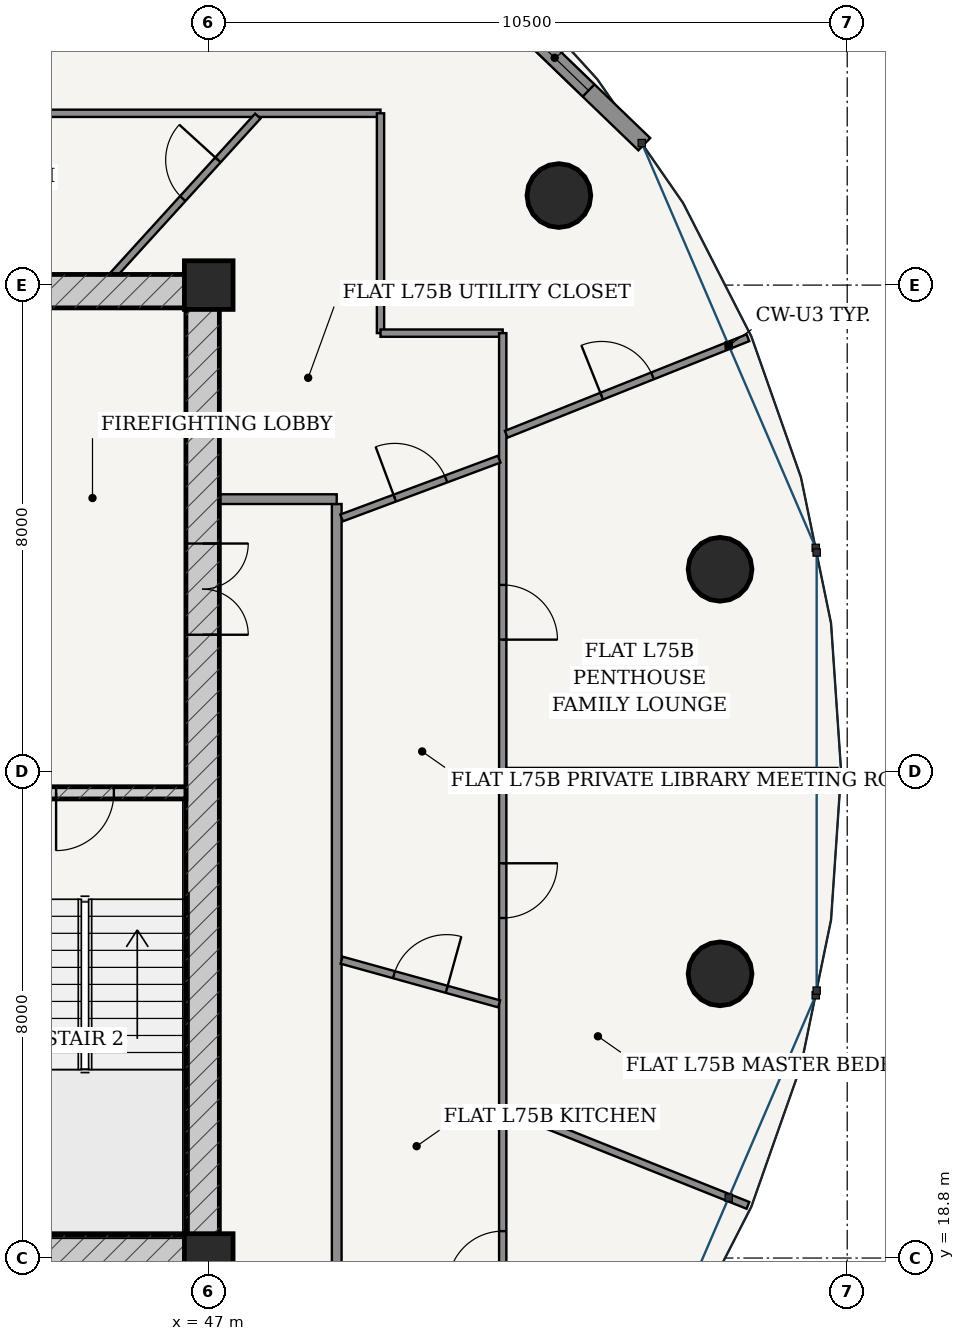
"""IFC4 building model, lengths in metres.
Left out: names, types, materials, properties, quantities, classifications, styles, units other than length and angle.
Written with IfcOpenShell. Run it as: python <this file> out.ifc"""

import sys

from ifc_helpers import new_model, si_unit, direction, frame, frame_2d, origin, origin_2d, place, context, subcontext, project, spatial, rectangle, hollow_circle, extrude, source, transform, mapped, element, fill, save


model = new_model("IFC4")
c1 = context("Model", 3, precision=1e-05, world=origin(), true_north=direction((-0.2419218956, 0.970295726276)))
c2 = subcontext(c1, "Body", "Model", "MODEL_VIEW")
j1 = project(units=[si_unit("LENGTHUNIT", "METRE"), si_unit("PLANEANGLEUNIT", "RADIAN")], contexts=[c1])
p1 = place(None, origin())
s1 = spatial("IfcSite", under=j1, at=p1, CompositionType="ELEMENT")
p2 = place(p1, origin())
s2 = spatial("IfcBuilding", under=s1, at=p2, CompositionType="ELEMENT")
p3 = place(p2, frame((0.0, 0.0, 285.7)))
s3 = spatial("IfcBuildingStorey", under=s2, at=p3, CompositionType="ELEMENT", Elevation=285.7)
for number, where, z_axis, x_axis in (
    (1, (47.0, 18.8, 0.0), (0.0, 0.0, 1.0), (1.0, 0.0, 0.0)),
    (2, (47.0, 34.8, 0.0), (0.0, 0.0, 1.0), (1.0, 0.0, 0.0)),
):
    element("IfcColumn", number, at=place(p3, frame(where, z_axis=z_axis, x_axis=x_axis)), inside=s3, PredefinedType="COLUMN", context=c2, shape_type="SweptSolid", body=[
        extrude(rectangle(XDim=0.8, YDim=0.8, at=origin_2d()), origin(), (0.0, 0.0, 1.0), 3.75),
    ])
p4 = place(p3, frame((28.825, 18.9, 0.0), z_axis=(0.0, 0.0, 1.0), x_axis=(1.0, 0.0, 0.0)))
e3 = element("IfcWall", 3, at=p4, inside=s3, PredefinedType="SHEAR", context=c2, shape_type="SweptSolid", body=[
    extrude(rectangle(XDim=18.35, YDim=0.55, at=frame_2d((9.175, 0.0))), origin(), (0.0, 0.0, 1.0), 3.49),
])
p5 = place(p4, frame((7.41, 0.0, 0.0)))
e4 = element("IfcOpeningElement", 4, at=p5, cuts=e3, PredefinedType="OPENING", context=c2, shape_type="SweptSolid", body=[
    extrude(rectangle(XDim=0.85, YDim=2.1, at=frame_2d((0.425, 1.05))), frame((0.0, 0.285, 0.0), z_axis=(0.0, -1.0, 0.0), x_axis=(1.0, 0.0, 0.0)), (0.0, 0.0, 1.0), 0.57),
])
p6 = place(p4, frame((10.49, 0.0, 0.0)))
e5 = element("IfcOpeningElement", 5, at=p6, cuts=e3, PredefinedType="OPENING", context=c2, shape_type="SweptSolid", body=[
    extrude(rectangle(XDim=0.85, YDim=2.1, at=frame_2d((0.425, 1.05))), frame((0.0, 0.285, 0.0), z_axis=(0.0, -1.0, 0.0), x_axis=(1.0, 0.0, 0.0)), (0.0, 0.0, 1.0), 0.57),
])
p7 = place(p3, frame((28.825, 34.7, 0.0), z_axis=(0.0, 0.0, 1.0), x_axis=(1.0, 0.0, 0.0)))
e6 = element("IfcWall", 6, at=p7, inside=s3, PredefinedType="SHEAR", context=c2, shape_type="SweptSolid", body=[
    extrude(rectangle(XDim=18.35, YDim=0.55, at=frame_2d((9.175, 0.0))), origin(), (0.0, 0.0, 1.0), 3.49),
])
p8 = place(p3, frame((46.9, 19.175, 0.0), z_axis=(0.0, 0.0, 1.0), x_axis=(0.0, 1.0, 0.0)))
e7 = element("IfcWall", 7, at=p8, inside=s3, PredefinedType="SHEAR", context=c2, shape_type="SweptSolid", body=[
    extrude(rectangle(XDim=15.25, YDim=0.55, at=frame_2d((7.625, 0.0))), origin(), (0.0, 0.0, 1.0), 3.49),
])
p9 = place(p8, frame((9.875, 0.0, 0.0)))
e8 = element("IfcOpeningElement", 8, at=p9, cuts=e7, PredefinedType="OPENING", context=c2, shape_type="SweptSolid", body=[
    extrude(rectangle(XDim=1.5, YDim=2.2, at=frame_2d((0.75, 1.1))), frame((0.0, 0.285, 0.0), z_axis=(0.0, -1.0, 0.0), x_axis=(1.0, 0.0, 0.0)), (0.0, 0.0, 1.0), 0.57),
])
p10 = place(p3, frame((43.305, 26.45, 0.0), z_axis=(0.0, 0.0, 1.0), x_axis=(1.0, 0.0, 0.0)))
e9 = element("IfcWall", 9, at=p10, inside=s3, PredefinedType="SOLIDWALL", context=c2, shape_type="SweptSolid", body=[
    extrude(rectangle(XDim=3.32, YDim=0.2, at=frame_2d((1.66, 0.0))), origin(), (0.0, 0.0, 1.0), 3.49),
])
p11 = place(p10, frame((1.185, 0.0, 0.0)))
e10 = element("IfcOpeningElement", 10, at=p11, cuts=e9, PredefinedType="OPENING", context=c2, shape_type="SweptSolid", body=[
    extrude(rectangle(XDim=0.95, YDim=2.15, at=frame_2d((0.475, 1.075))), frame((0.0, 0.11, 0.0), z_axis=(0.0, -1.0, 0.0), x_axis=(1.0, 0.0, 0.0)), (0.0, 0.0, 1.0), 0.22),
])
for number, where, z_axis, x_axis in (
    (11, (55.409, 30.126, 0.0), (0.0, 0.0, 1.0), (1.0, 0.0, 0.0)),
    (12, (52.759, 36.272, 0.0), (0.0, 0.0, 1.0), (1.0, 0.0, 0.0)),
    (13, (55.409, 23.474, 0.0), (0.0, 0.0, 1.0), (1.0, 0.0, 0.0)),
):
    element("IfcColumn", number, at=place(p3, frame(where, z_axis=z_axis, x_axis=x_axis)), inside=s3, PredefinedType="COLUMN", context=c2, shape_type="SweptSolid", body=[
        extrude(hollow_circle(Radius=0.525, WallThickness=0.035, at=origin_2d()), origin(), (0.0, 0.0, 1.0), 3.75),
    ])
p12 = place(p3, frame((54.163, 37.117, 0.0), z_axis=(0.0, 0.0, 1.0), x_axis=(-0.719979309073, 0.693995529169, 0.0)))
e14 = element("IfcWall", 14, at=p12, inside=s3, PredefinedType="SOLIDWALL", context=c2, shape_type="SweptSolid", body=[
    extrude(rectangle(XDim=7.583, YDim=0.28, at=frame_2d((3.791, 0.0))), origin(), (0.0, 0.0, 1.0), 3.49),
])
p13 = place(p12, frame((1.272, 0.0, 0.85)))
e15 = element("IfcOpeningElement", 15, at=p13, cuts=e14, PredefinedType="OPENING", context=c2, shape_type="SweptSolid", body=[
    extrude(rectangle(XDim=1.55, YDim=1.95, at=frame_2d((0.775, 0.975))), frame((0.0, 0.15, 0.0), z_axis=(0.0, -1.0, 0.0), x_axis=(1.0, 0.0, 0.0)), (0.0, 0.0, 1.0), 0.3),
])
p14 = place(p12, frame((4.76, 0.0, 0.85)))
e16 = element("IfcOpeningElement", 16, at=p14, cuts=e14, PredefinedType="OPENING", context=c2, shape_type="SweptSolid", body=[
    extrude(rectangle(XDim=1.55, YDim=1.95, at=frame_2d((0.775, 0.975))), frame((0.0, 0.15, 0.0), z_axis=(0.0, -1.0, 0.0), x_axis=(1.0, 0.0, 0.0)), (0.0, 0.0, 1.0), 0.3),
])
p15 = place(p3, frame((49.105, 17.275, 0.0), z_axis=(0.0, 0.0, 1.0), x_axis=(0.0, 1.0, 0.0)))
e17 = element("IfcWall", 17, at=p15, inside=s3, PredefinedType="PARTITIONING", context=c2, shape_type="SweptSolid", body=[
    extrude(rectangle(XDim=13.925, YDim=0.16, at=frame_2d((6.962, 0.0))), origin(), (0.0, 0.0, 1.0), 3.015),
])
p16 = place(p3, frame((47.175, 31.28, 0.0), z_axis=(0.0, 0.0, 1.0), x_axis=(1.0, 0.0, 0.0)))
e18 = element("IfcWall", 18, at=p16, inside=s3, PredefinedType="PARTITIONING", context=c2, shape_type="SweptSolid", body=[
    extrude(rectangle(XDim=1.93, YDim=0.16, at=frame_2d((0.965, 0.0))), origin(), (0.0, 0.0, 1.0), 3.49),
])
p17 = place(p3, frame((40.336, 37.625, 0.0), z_axis=(0.0, 0.0, 1.0), x_axis=(1.0, 0.0, 0.0)))
e19 = element("IfcWall", 19, at=p17, inside=s3, PredefinedType="PARTITIONING", context=c2, shape_type="SweptSolid", body=[
    extrude(rectangle(XDim=9.489, YDim=0.12, at=frame_2d((4.745, 0.0))), origin(), (0.0, 0.0, 1.0), 3.015),
])
p18 = place(p3, frame((49.825, 37.625, 0.0), z_axis=(0.0, 0.0, 1.0), x_axis=(0.0, -1.0, 0.0)))
e20 = element("IfcWall", 20, at=p18, inside=s3, PredefinedType="PARTITIONING", context=c2, shape_type="SweptSolid", body=[
    extrude(rectangle(XDim=3.615, YDim=0.12, at=frame_2d((1.808, 0.0))), origin(), (0.0, 0.0, 1.0), 3.015),
])
p19 = place(p3, frame((49.825, 34.01, 0.0), z_axis=(0.0, 0.0, 1.0), x_axis=(1.0, 0.0, 0.0)))
e21 = element("IfcWall", 21, at=p19, inside=s3, PredefinedType="PARTITIONING", context=c2, shape_type="SweptSolid", body=[
    extrude(rectangle(XDim=2.01, YDim=0.12, at=frame_2d((1.005, 0.0))), origin(), (0.0, 0.0, 1.0), 3.209),
])
p20 = place(p3, frame((51.835, 34.01, 0.0), z_axis=(0.0, 0.0, 1.0), x_axis=(0.0, -1.0, 0.0)))
e22 = element("IfcWall", 22, at=p20, inside=s3, PredefinedType="PARTITIONING", context=c2, shape_type="SweptSolid", body=[
    extrude(rectangle(XDim=19.545, YDim=0.12, at=frame_2d((9.772, 0.0))), origin(), (0.0, 0.0, 1.0), 3.015),
])
p21 = place(p20, frame((14.768, 0.0, 0.0)))
e23 = element("IfcOpeningElement", 23, at=p21, cuts=e22, PredefinedType="OPENING", context=c2, shape_type="SweptSolid", body=[
    extrude(rectangle(XDim=0.9, YDim=2.15, at=frame_2d((0.45, 1.075))), frame((0.0, 0.07, 0.0), z_axis=(0.0, -1.0, 0.0), x_axis=(1.0, 0.0, 0.0)), (0.0, 0.0, 1.0), 0.14),
])
p22 = place(p20, frame((8.718, 0.0, 0.0)))
e24 = element("IfcOpeningElement", 24, at=p22, cuts=e22, PredefinedType="OPENING", context=c2, shape_type="SweptSolid", body=[
    extrude(rectangle(XDim=0.9, YDim=2.15, at=frame_2d((0.45, 1.075))), frame((0.0, 0.07, 0.0), z_axis=(0.0, -1.0, 0.0), x_axis=(1.0, 0.0, 0.0)), (0.0, 0.0, 1.0), 0.14),
])
p23 = place(p20, frame((4.14, 0.0, 0.0)))
e25 = element("IfcOpeningElement", 25, at=p23, cuts=e22, PredefinedType="OPENING", context=c2, shape_type="SweptSolid", body=[
    extrude(rectangle(XDim=0.9, YDim=2.15, at=frame_2d((0.45, 1.075))), frame((0.0, 0.07, 0.0), z_axis=(0.0, -1.0, 0.0), x_axis=(1.0, 0.0, 0.0)), (0.0, 0.0, 1.0), 0.14),
])
p24 = place(p3, frame((51.893, 21.253, 0.0), z_axis=(0.0, 0.0, 1.0), x_axis=(0.928712556691, -0.370800467966, 0.0)))
e26 = element("IfcWall", 26, at=p24, inside=s3, PredefinedType="PARTITIONING", context=c2, shape_type="SweptSolid", body=[
    extrude(rectangle(XDim=4.28, YDim=0.12, at=frame_2d((2.14, 0.0))), origin(), (0.0, 0.0, 1.0), 3.121),
])
p25 = place(p3, frame((51.897, 26.8, 0.0), z_axis=(0.0, 0.0, 1.0), x_axis=(1.0, 0.0, 0.0)))
e27 = element("IfcWall", 27, at=p25, inside=s3, PredefinedType="PARTITIONING", context=c2, shape_type="SweptSolid", body=[
    extrude(rectangle(XDim=5.443, YDim=0.12, at=frame_2d((2.722, 0.0))), origin(), (0.0, 0.0, 1.0), 3.121),
])
p26 = place(p3, frame((51.893, 32.347, 0.0), z_axis=(0.0, 0.0, 1.0), x_axis=(0.928712556691, 0.370800467966, 0.0)))
e28 = element("IfcWall", 28, at=p26, inside=s3, PredefinedType="PARTITIONING", context=c2, shape_type="SweptSolid", body=[
    extrude(rectangle(XDim=4.28, YDim=0.12, at=frame_2d((2.14, 0.0))), origin(), (0.0, 0.0, 1.0), 3.121),
])
p27 = place(p26, frame((1.69, 0.0, 0.0)))
e29 = element("IfcOpeningElement", 29, at=p27, cuts=e28, PredefinedType="OPENING", context=c2, shape_type="SweptSolid", body=[
    extrude(rectangle(XDim=0.9, YDim=2.15, at=frame_2d((0.45, 1.075))), frame((0.0, 0.07, 0.0), z_axis=(0.0, -1.0, 0.0), x_axis=(1.0, 0.0, 0.0)), (0.0, 0.0, 1.0), 0.14),
])
p28 = place(p3, frame((49.185, 23.698, 0.0), z_axis=(0.0, 0.0, 1.0), x_axis=(0.963633636359, -0.267226897744, 0.0)))
e30 = element("IfcWall", 30, at=p28, inside=s3, PredefinedType="PARTITIONING", context=c2, shape_type="SweptSolid", body=[
    extrude(rectangle(XDim=2.688, YDim=0.12, at=frame_2d((1.344, 0.0))), origin(), (0.0, 0.0, 1.0), 3.209),
])
p29 = place(p28, frame((0.894, 0.0, 0.0)))
e31 = element("IfcOpeningElement", 31, at=p29, cuts=e30, PredefinedType="OPENING", context=c2, shape_type="SweptSolid", body=[
    extrude(rectangle(XDim=0.9, YDim=2.15, at=frame_2d((0.45, 1.075))), frame((0.0, 0.07, 0.0), z_axis=(0.0, -1.0, 0.0), x_axis=(1.0, 0.0, 0.0)), (0.0, 0.0, 1.0), 0.14),
])
p30 = place(p3, frame((49.185, 30.971, 0.0), z_axis=(0.0, 0.0, 1.0), x_axis=(0.93696600231, 0.349420535338, 0.0)))
e32 = element("IfcWall", 32, at=p30, inside=s3, PredefinedType="PARTITIONING", context=c2, shape_type="SweptSolid", body=[
    extrude(rectangle(XDim=2.766, YDim=0.12, at=frame_2d((1.383, 0.0))), origin(), (0.0, 0.0, 1.0), 3.209),
])
p31 = place(p30, frame((0.933, 0.0, 0.0)))
e33 = element("IfcOpeningElement", 33, at=p31, cuts=e32, PredefinedType="OPENING", context=c2, shape_type="SweptSolid", body=[
    extrude(rectangle(XDim=0.9, YDim=2.15, at=frame_2d((0.45, 1.075))), frame((0.0, 0.07, 0.0), z_axis=(0.0, -1.0, 0.0), x_axis=(1.0, 0.0, 0.0)), (0.0, 0.0, 1.0), 0.14),
])
p32 = place(p3, frame((45.439, 34.977, 0.0), z_axis=(0.0, 0.0, 1.0), x_axis=(0.672980108938, 0.739660579573, 0.0)))
e34 = element("IfcWall", 34, at=p32, inside=s3, PredefinedType="PARTITIONING", context=c2, shape_type="SweptSolid", body=[
    extrude(rectangle(XDim=3.519, YDim=0.12, at=frame_2d((1.759, 0.0))), origin(), (0.0, 0.0, 1.0), 3.015),
])
p33 = place(p32, frame((1.685, 0.0, 0.0)))
e35 = element("IfcOpeningElement", 35, at=p33, cuts=e34, PredefinedType="OPENING", context=c2, shape_type="SweptSolid", body=[
    extrude(rectangle(XDim=0.86, YDim=2.15, at=frame_2d((0.43, 1.075))), frame((0.0, 0.07, 0.0), z_axis=(0.0, -1.0, 0.0), x_axis=(1.0, 0.0, 0.0)), (0.0, 0.0, 1.0), 0.14),
])
m1 = source(origin(), c2, "Body", "SweptSolid", [
    extrude(rectangle(XDim=1.55, YDim=1.95, at=frame_2d((0.775, 0.975))), frame((0.0, 0.03, 0.0), z_axis=(0.0, -1.0, 0.0), x_axis=(1.0, 0.0, 0.0)), (0.0, 0.0, 1.0), 0.06),
])
p34 = place(p13, origin())
e36 = element("IfcWindow", 36, at=p34, inside=s3, PartitioningType="SINGLE_PANEL", PredefinedType="WINDOW", context=c2, shape_type="MappedRepresentation", body=[
    mapped(m1, transform((0.0, 0.0, 0.0), scale=1.0)),
])
fill(e15, e36)
m2 = source(origin(), c2, "Body", "SweptSolid", [
    extrude(rectangle(XDim=1.5, YDim=2.2, at=frame_2d((0.75, 1.1))), frame((0.0, 0.025, 0.0), z_axis=(0.0, -1.0, 0.0), x_axis=(1.0, 0.0, 0.0)), (0.0, 0.0, 1.0), 0.05),
])
p35 = place(p9, frame((1.5, 0.0, 0.0), z_axis=(0.0, 0.0, 1.0), x_axis=(-1.0, 0.0, 0.0)))
e37 = element("IfcDoor", 37, at=p35, inside=s3, OperationType="DOUBLE_DOOR_SINGLE_SWING", PredefinedType="DOOR", context=c2, shape_type="MappedRepresentation", body=[
    mapped(m2, transform((0.0, 0.0, 0.0), scale=1.0)),
])
fill(e8, e37)
m3 = source(origin(), c2, "Body", "SweptSolid", [
    extrude(rectangle(XDim=0.95, YDim=2.15, at=frame_2d((0.475, 1.075))), frame((0.0, 0.025, 0.0), z_axis=(0.0, -1.0, 0.0), x_axis=(1.0, 0.0, 0.0)), (0.0, 0.0, 1.0), 0.05),
])
p36 = place(p11, frame((0.95, 0.0, 0.0), z_axis=(0.0, 0.0, 1.0), x_axis=(-1.0, 0.0, 0.0)))
e38 = element("IfcDoor", 38, at=p36, inside=s3, OperationType="SINGLE_SWING_RIGHT", PredefinedType="DOOR", context=c2, shape_type="MappedRepresentation", body=[
    mapped(m3, transform((0.0, 0.0, 0.0), scale=1.0)),
])
fill(e10, e38)
m4 = source(origin(), c2, "Body", "SweptSolid", [
    extrude(rectangle(XDim=0.9, YDim=2.15, at=frame_2d((0.45, 1.075))), frame((0.0, 0.025, 0.0), z_axis=(0.0, -1.0, 0.0), x_axis=(1.0, 0.0, 0.0)), (0.0, 0.0, 1.0), 0.05),
])
p37 = place(p21, frame((0.9, 0.0, 0.0), z_axis=(0.0, 0.0, 1.0), x_axis=(-1.0, 0.0, 0.0)))
e39 = element("IfcDoor", 39, at=p37, inside=s3, OperationType="SINGLE_SWING_LEFT", PredefinedType="DOOR", context=c2, shape_type="MappedRepresentation", body=[
    mapped(m4, transform((0.0, 0.0, 0.0), scale=1.0)),
])
fill(e23, e39)
p38 = place(p29, origin())
e40 = element("IfcDoor", 40, at=p38, inside=s3, OperationType="SINGLE_SWING_RIGHT", PredefinedType="DOOR", context=c2, shape_type="MappedRepresentation", body=[
    mapped(m4, transform((0.0, 0.0, 0.0), scale=1.0)),
])
fill(e31, e40)
p39 = place(p31, origin())
e41 = element("IfcDoor", 41, at=p39, inside=s3, OperationType="SINGLE_SWING_LEFT", PredefinedType="DOOR", context=c2, shape_type="MappedRepresentation", body=[
    mapped(m4, transform((0.0, 0.0, 0.0), scale=1.0)),
])
fill(e33, e41)
m5 = source(origin(), c2, "Body", "SweptSolid", [
    extrude(rectangle(XDim=0.86, YDim=2.15, at=frame_2d((0.43, 1.075))), frame((0.0, 0.025, 0.0), z_axis=(0.0, -1.0, 0.0), x_axis=(1.0, 0.0, 0.0)), (0.0, 0.0, 1.0), 0.05),
])
p40 = place(p33, origin())
e42 = element("IfcDoor", 42, at=p40, inside=s3, OperationType="SINGLE_SWING_RIGHT", PredefinedType="DOOR", context=c2, shape_type="MappedRepresentation", body=[
    mapped(m5, transform((0.0, 0.0, 0.0), scale=1.0)),
])
fill(e35, e42)
p41 = place(p22, origin())
e43 = element("IfcDoor", 43, at=p41, inside=s3, OperationType="SINGLE_SWING_LEFT", PredefinedType="DOOR", context=c2, shape_type="MappedRepresentation", body=[
    mapped(m4, transform((0.0, 0.0, 0.0), scale=1.0)),
])
fill(e24, e43)
p42 = place(p23, origin())
e44 = element("IfcDoor", 44, at=p42, inside=s3, OperationType="SINGLE_SWING_RIGHT", PredefinedType="DOOR", context=c2, shape_type="MappedRepresentation", body=[
    mapped(m4, transform((0.0, 0.0, 0.0), scale=1.0)),
])
fill(e25, e44)
p43 = place(p27, origin())
e45 = element("IfcDoor", 45, at=p43, inside=s3, OperationType="SINGLE_SWING_LEFT", PredefinedType="DOOR", context=c2, shape_type="MappedRepresentation", body=[
    mapped(m4, transform((0.0, 0.0, 0.0), scale=1.0)),
])
fill(e29, e45)
save(model, sys.argv[1])
